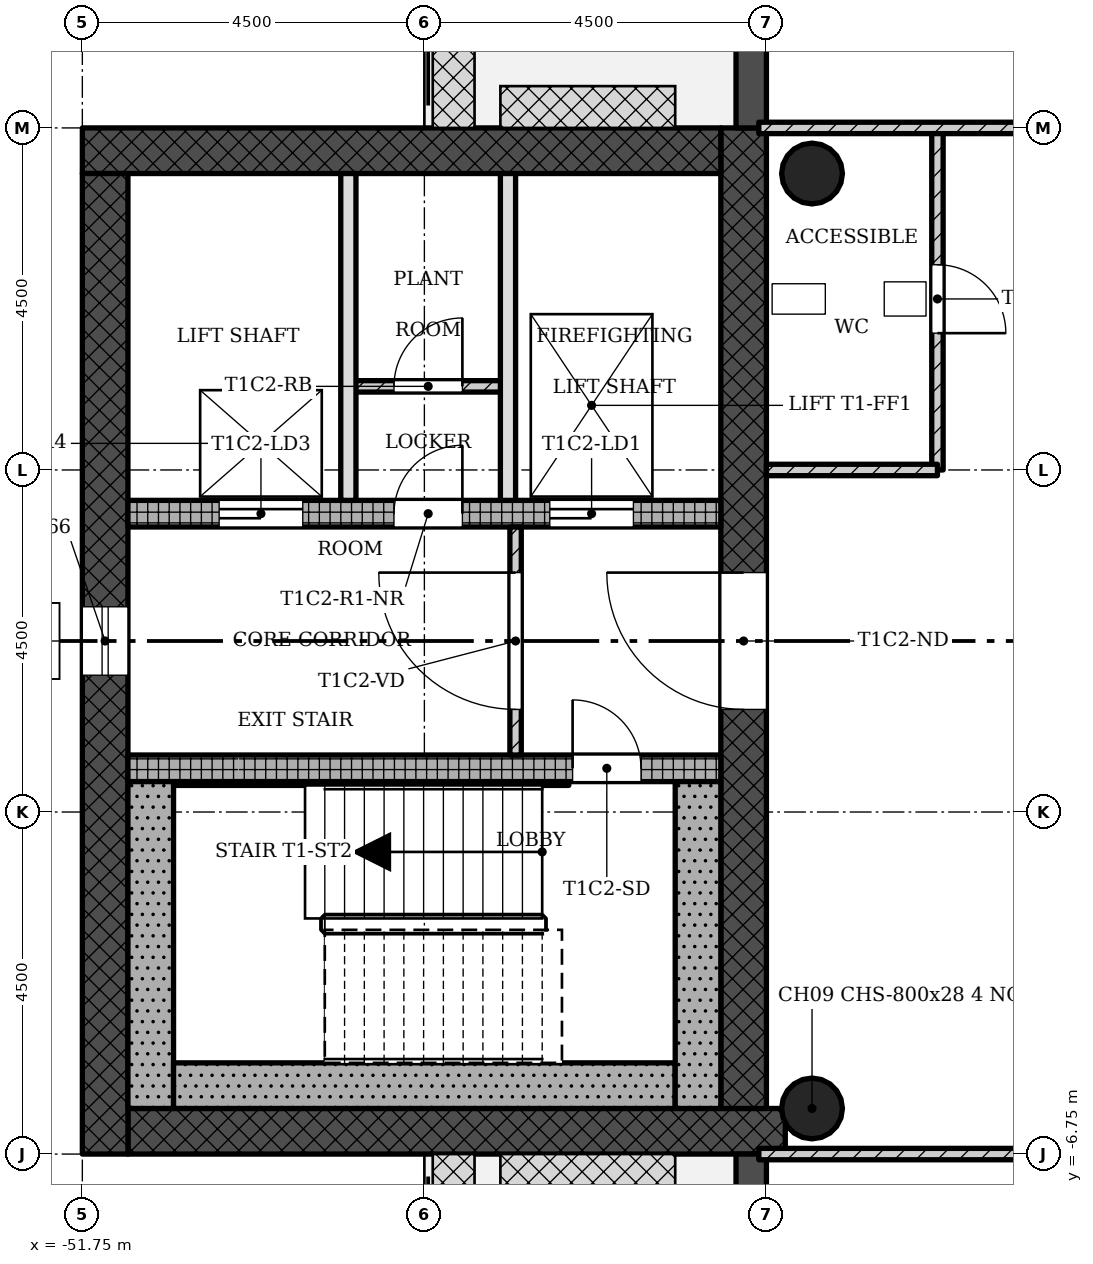
"""IFC4 building model, lengths in metres.
Left out: names, types, materials, properties, quantities, classifications, styles, units other than length and angle.
Written with IfcOpenShell. Run it as: python <this file> out.ifc"""

import sys

from ifc_helpers import new_model, si_unit, direction, frame, frame_2d, origin, origin_2d, place, context, subcontext, project, spatial, rectangle, hollow_circle, extrude, element, fill, save


model = new_model("IFC4")
c1 = context("Model", 3, precision=1e-05, world=origin(), true_north=direction((0.0, 1.0)))
c2 = subcontext(c1, "Body", "Model", "MODEL_VIEW")
j1 = project(units=[si_unit("LENGTHUNIT", "METRE"), si_unit("PLANEANGLEUNIT", "RADIAN")], contexts=[c1])
p1 = place(None, origin())
s1 = spatial("IfcSite", under=j1, at=p1, CompositionType="ELEMENT")
p2 = place(p1, origin())
s2 = spatial("IfcBuilding", under=s1, at=p2, CompositionType="ELEMENT")
p3 = place(p2, frame((0.0, 0.0, 237.9)))
s3 = spatial("IfcBuildingStorey", under=s2, at=p3, CompositionType="ELEMENT", Elevation=237.9)
p4 = place(p3, frame((-51.15, -6.45, 0.0), z_axis=(0.0, 0.0, 1.0), x_axis=(1.0, 0.0, 0.0)))
e1 = element("IfcWall", 1, at=p4, inside=s3, PredefinedType="SHEAR", context=c2, shape_type="SweptSolid", body=[
    extrude(rectangle(XDim=8.648, YDim=0.6, at=frame_2d((4.324, 0.0))), origin(), (0.0, 0.0, 1.0), 4.5),
])
p5 = place(p3, frame((-43.05, -6.15, 0.0), z_axis=(0.0, 0.0, 1.0), x_axis=(0.0, 1.0, 0.0)))
e2 = element("IfcWall", 2, at=p5, inside=s3, PredefinedType="SHEAR", context=c2, shape_type="SweptSolid", body=[
    extrude(rectangle(XDim=12.9, YDim=0.6, at=frame_2d((6.45, 0.0))), origin(), (0.0, 0.0, 1.0), 4.5),
])
p6 = place(p5, frame((5.25, 0.0, 0.0)))
e3 = element("IfcOpeningElement", 3, at=p6, cuts=e2, PredefinedType="OPENING", context=c2, shape_type="SweptSolid", body=[
    extrude(rectangle(XDim=1.8, YDim=2.1, at=frame_2d((0.9, 1.05))), frame((0.0, 0.31, 0.0), z_axis=(0.0, -1.0, 0.0), x_axis=(1.0, 0.0, 0.0)), (0.0, 0.0, 1.0), 0.62),
])
p7 = place(p3, frame((-43.35, 6.45, 0.0), z_axis=(0.0, 0.0, 1.0), x_axis=(-1.0, 0.0, 0.0)))
e4 = element("IfcWall", 4, at=p7, inside=s3, PredefinedType="SHEAR", context=c2, shape_type="SweptSolid", body=[
    extrude(rectangle(XDim=8.4, YDim=0.6, at=frame_2d((4.2, 0.0))), origin(), (0.0, 0.0, 1.0), 4.5),
])
p8 = place(p3, frame((-51.45, 6.15, 0.0), z_axis=(0.0, 0.0, 1.0), x_axis=(0.0, -1.0, 0.0)))
e5 = element("IfcWall", 5, at=p8, inside=s3, PredefinedType="SHEAR", context=c2, shape_type="SweptSolid", body=[
    extrude(rectangle(XDim=12.9, YDim=0.6, at=frame_2d((6.45, 0.0))), origin(), (0.0, 0.0, 1.0), 4.5),
])
p9 = place(p8, frame((5.7, 0.0, 0.45)))
e6 = element("IfcOpeningElement", 6, at=p9, cuts=e5, PredefinedType="OPENING", context=c2, shape_type="SweptSolid", body=[
    extrude(rectangle(XDim=0.9, YDim=2.4, at=frame_2d((0.45, 1.2))), frame((0.0, 0.31, 0.0), z_axis=(0.0, -1.0, 0.0), x_axis=(1.0, 0.0, 0.0)), (0.0, 0.0, 1.0), 0.62),
])
p10 = place(p3, frame((-51.15, -1.675, 0.0), z_axis=(0.0, 0.0, 1.0), x_axis=(1.0, 0.0, 0.0)))
e7 = element("IfcWall", 7, at=p10, inside=s3, PredefinedType="SHEAR", context=c2, shape_type="SweptSolid", body=[
    extrude(rectangle(XDim=7.8, YDim=0.35, at=frame_2d((3.9, 0.0))), origin(), (0.0, 0.0, 1.0), 4.5),
])
p11 = place(p10, frame((5.85, 0.0, 0.0)))
e8 = element("IfcOpeningElement", 8, at=p11, cuts=e7, PredefinedType="OPENING", context=c2, shape_type="SweptSolid", body=[
    extrude(rectangle(XDim=0.9, YDim=2.1, at=frame_2d((0.45, 1.05))), frame((0.0, 0.185, 0.0), z_axis=(0.0, -1.0, 0.0), x_axis=(1.0, 0.0, 0.0)), (0.0, 0.0, 1.0), 0.37),
])
p12 = place(p3, frame((-51.15, 1.675, 0.0), z_axis=(0.0, 0.0, 1.0), x_axis=(1.0, 0.0, 0.0)))
e9 = element("IfcWall", 9, at=p12, inside=s3, PredefinedType="SHEAR", context=c2, shape_type="SweptSolid", body=[
    extrude(rectangle(XDim=7.8, YDim=0.35, at=frame_2d((3.9, 0.0))), origin(), (0.0, 0.0, 1.0), 4.5),
])
p13 = place(p12, frame((5.55, 0.0, 0.0)))
e10 = element("IfcOpeningElement", 10, at=p13, cuts=e9, PredefinedType="OPENING", context=c2, shape_type="SweptSolid", body=[
    extrude(rectangle(XDim=1.1, YDim=2.1, at=frame_2d((0.55, 1.05))), frame((0.0, 0.185, 0.0), z_axis=(0.0, -1.0, 0.0), x_axis=(1.0, 0.0, 0.0)), (0.0, 0.0, 1.0), 0.37),
])
p14 = place(p12, frame((1.2, 0.0, 0.0)))
e11 = element("IfcOpeningElement", 11, at=p14, cuts=e9, PredefinedType="OPENING", context=c2, shape_type="SweptSolid", body=[
    extrude(rectangle(XDim=1.1, YDim=2.1, at=frame_2d((0.55, 1.05))), frame((0.0, 0.185, 0.0), z_axis=(0.0, -1.0, 0.0), x_axis=(1.0, 0.0, 0.0)), (0.0, 0.0, 1.0), 0.37),
])
p15 = place(p12, frame((3.5, 0.0, 0.0)))
e12 = element("IfcOpeningElement", 12, at=p15, cuts=e9, PredefinedType="OPENING", context=c2, shape_type="SweptSolid", body=[
    extrude(rectangle(XDim=0.9, YDim=2.1, at=frame_2d((0.45, 1.05))), frame((0.0, 0.185, 0.0), z_axis=(0.0, -1.0, 0.0), x_axis=(1.0, 0.0, 0.0)), (0.0, 0.0, 1.0), 0.37),
])
for number, where, z_axis, x_axis in (
    (13, (-42.15, -6.15, 0.0), (0.0, 0.0, 1.0), (1.0, 0.0, 0.0)),
    (14, (-42.15, 6.15, 0.0), (0.0, 0.0, 1.0), (1.0, 0.0, 0.0)),
):
    element("IfcColumn", number, at=place(p3, frame(where, z_axis=z_axis, x_axis=x_axis)), inside=s3, PredefinedType="COLUMN", context=c2, shape_type="SweptSolid", body=[
        extrude(hollow_circle(Radius=0.4, WallThickness=0.028, at=origin_2d()), origin(), (0.0, 0.0, 1.0), 4.5),
    ])
p16 = place(p3, frame((-42.95, -6.75, -0.02), z_axis=(0.0, 0.0, 1.0), x_axis=(0.0, -1.0, 0.0)))
e15 = element("IfcWall", 15, at=p16, inside=s3, PredefinedType="STANDARD", context=c2, shape_type="SweptSolid", body=[
    extrude(rectangle(XDim=4.5, YDim=0.4, at=frame_2d((2.25, 0.0))), origin(), (0.0, 0.0, 1.0), 4.22),
])
p17 = place(p16, frame((1.35, 0.0, 0.02)))
e16 = element("IfcOpeningElement", 16, at=p17, cuts=e15, PredefinedType="OPENING", context=c2, shape_type="SweptSolid", body=[
    extrude(rectangle(XDim=1.8, YDim=2.1, at=frame_2d((0.9, 1.05))), frame((0.0, 0.21, 0.0), z_axis=(0.0, -1.0, 0.0), x_axis=(1.0, 0.0, 0.0)), (0.0, 0.0, 1.0), 0.42),
])
p18 = place(p3, frame((-42.95, 11.25, -0.02), z_axis=(0.0, 0.0, 1.0), x_axis=(0.0, -1.0, 0.0)))
e17 = element("IfcWall", 17, at=p18, inside=s3, PredefinedType="STANDARD", context=c2, shape_type="SweptSolid", body=[
    extrude(rectangle(XDim=4.5, YDim=0.4, at=frame_2d((2.25, 0.0))), origin(), (0.0, 0.0, 1.0), 4.22),
])
p19 = place(p18, frame((1.35, 0.0, 0.02)))
e18 = element("IfcOpeningElement", 18, at=p19, cuts=e17, PredefinedType="OPENING", context=c2, shape_type="SweptSolid", body=[
    extrude(rectangle(XDim=1.8, YDim=2.1, at=frame_2d((0.9, 1.05))), frame((0.0, 0.21, 0.0), z_axis=(0.0, -1.0, 0.0), x_axis=(1.0, 0.0, 0.0)), (0.0, 0.0, 1.0), 0.42),
])
p20 = place(p3, frame((-46.05, 1.5, 0.0), z_axis=(0.0, 0.0, 1.0), x_axis=(0.0, -1.0, 0.0)))
e19 = element("IfcWall", 19, at=p20, inside=s3, PredefinedType="PARTITIONING", context=c2, shape_type="SweptSolid", body=[
    extrude(rectangle(XDim=3.0, YDim=0.15, at=frame_2d((1.5, 0.0))), origin(), (0.0, 0.0, 1.0), 4.1),
])
p21 = place(p20, frame((0.6, 0.0, 0.0)))
e20 = element("IfcOpeningElement", 20, at=p21, cuts=e19, PredefinedType="OPENING", context=c2, shape_type="SweptSolid", body=[
    extrude(rectangle(XDim=1.8, YDim=2.1, at=frame_2d((0.9, 1.05))), frame((0.0, 0.085, 0.0), z_axis=(0.0, -1.0, 0.0), x_axis=(1.0, 0.0, 0.0)), (0.0, 0.0, 1.0), 0.17),
])
for number, where, z_axis, x_axis in (
    (21, (-48.25, 6.15, 0.0), (0.0, 0.0, 1.0), (0.0, -1.0, 0.0)),
    (22, (-46.15, 6.15, 0.0), (0.0, 0.0, 1.0), (0.0, -1.0, 0.0)),
):
    element("IfcWall", number, at=place(p3, frame(where, z_axis=z_axis, x_axis=x_axis)), inside=s3, PredefinedType="SOLIDWALL", context=c2, shape_type="SweptSolid", body=[
        extrude(rectangle(XDim=4.3, YDim=0.2, at=frame_2d((2.15, 0.0))), origin(), (0.0, 0.0, 1.0), 4.1),
    ])
p22 = place(p3, frame((-46.15, 3.35, 0.0), z_axis=(0.0, 0.0, 1.0), x_axis=(-1.0, 0.0, 0.0)))
e23 = element("IfcWall", 23, at=p22, inside=s3, PredefinedType="PARTITIONING", context=c2, shape_type="SweptSolid", body=[
    extrude(rectangle(XDim=2.1, YDim=0.15, at=frame_2d((1.05, 0.0))), origin(), (0.0, 0.0, 1.0), 4.1),
])
p23 = place(p22, frame((0.6, 0.0, 0.0)))
e24 = element("IfcOpeningElement", 24, at=p23, cuts=e23, PredefinedType="OPENING", context=c2, shape_type="SweptSolid", body=[
    extrude(rectangle(XDim=0.9, YDim=2.1, at=frame_2d((0.45, 1.05))), frame((0.0, 0.085, 0.0), z_axis=(0.0, -1.0, 0.0), x_axis=(1.0, 0.0, 0.0)), (0.0, 0.0, 1.0), 0.17),
])
p24 = place(p3, frame((-40.5, 2.25, 0.0), z_axis=(0.0, 0.0, 1.0), x_axis=(0.0, 1.0, 0.0)))
e25 = element("IfcWall", 25, at=p24, inside=s3, PredefinedType="PARTITIONING", context=c2, shape_type="SweptSolid", body=[
    extrude(rectangle(XDim=4.5, YDim=0.15, at=frame_2d((2.25, 0.0))), origin(), (0.0, 0.0, 1.0), 4.1),
])
p25 = place(p24, frame((1.8, 0.0, 0.0)))
e26 = element("IfcOpeningElement", 26, at=p25, cuts=e25, PredefinedType="OPENING", context=c2, shape_type="SweptSolid", body=[
    extrude(rectangle(XDim=0.9, YDim=2.1, at=frame_2d((0.45, 1.05))), frame((0.0, 0.085, 0.0), z_axis=(0.0, -1.0, 0.0), x_axis=(1.0, 0.0, 0.0)), (0.0, 0.0, 1.0), 0.17),
])
p26 = place(p3, frame((-42.75, 2.25, 0.0), z_axis=(0.0, 0.0, 1.0), x_axis=(1.0, 0.0, 0.0)))
e27 = element("IfcWall", 27, at=p26, inside=s3, PredefinedType="PARTITIONING", context=c2, shape_type="SweptSolid", body=[
    extrude(rectangle(XDim=2.25, YDim=0.15, at=frame_2d((1.125, 0.0))), origin(), (0.0, 0.0, 1.0), 4.1),
])
p27 = place(p3, frame((-42.85, 6.75, 0.0), z_axis=(0.0, 0.0, 1.0), x_axis=(1.0, 0.0, 0.0)))
e28 = element("IfcWall", 28, at=p27, inside=s3, PredefinedType="PARTITIONING", context=c2, shape_type="SweptSolid", body=[
    extrude(rectangle(XDim=13.7, YDim=0.15, at=frame_2d((6.85, 0.0))), origin(), (0.0, 0.0, 1.0), 4.1),
])
p28 = place(p27, frame((5.95, 0.0, 0.0)))
e29 = element("IfcOpeningElement", 29, at=p28, cuts=e28, PredefinedType="OPENING", context=c2, shape_type="SweptSolid", body=[
    extrude(rectangle(XDim=1.8, YDim=2.1, at=frame_2d((0.9, 1.05))), frame((0.0, 0.085, 0.0), z_axis=(0.0, -1.0, 0.0), x_axis=(1.0, 0.0, 0.0)), (0.0, 0.0, 1.0), 0.17),
])
p29 = place(p3, frame((-42.85, -6.75, 0.0), z_axis=(0.0, 0.0, 1.0), x_axis=(1.0, 0.0, 0.0)))
e30 = element("IfcWall", 30, at=p29, inside=s3, PredefinedType="PARTITIONING", context=c2, shape_type="SweptSolid", body=[
    extrude(rectangle(XDim=13.7, YDim=0.15, at=frame_2d((6.85, 0.0))), origin(), (0.0, 0.0, 1.0), 4.1),
])
p30 = place(p29, frame((5.95, 0.0, 0.0)))
e31 = element("IfcOpeningElement", 31, at=p30, cuts=e30, PredefinedType="OPENING", context=c2, shape_type="SweptSolid", body=[
    extrude(rectangle(XDim=1.8, YDim=2.1, at=frame_2d((0.9, 1.05))), frame((0.0, 0.085, 0.0), z_axis=(0.0, -1.0, 0.0), x_axis=(1.0, 0.0, 0.0)), (0.0, 0.0, 1.0), 0.17),
])
p31 = place(p3, frame((-50.85, -1.85, 0.0), z_axis=(0.0, 0.0, 1.0), x_axis=(0.0, -1.0, 0.0)))
e32 = element("IfcWall", 32, at=p31, inside=s3, PredefinedType="SHEAR", context=c2, shape_type="SweptSolid", body=[
    extrude(rectangle(XDim=4.3, YDim=0.6, at=frame_2d((2.15, 0.0))), origin(), (0.0, 0.0, 1.0), 4.5),
])
p32 = place(p3, frame((-43.95, -5.85, 0.0), z_axis=(0.0, 0.0, 1.0), x_axis=(-1.0, 0.0, 0.0)))
e33 = element("IfcWall", 33, at=p32, inside=s3, PredefinedType="SHEAR", context=c2, shape_type="SweptSolid", body=[
    extrude(rectangle(XDim=6.6, YDim=0.6, at=frame_2d((3.3, 0.0))), origin(), (0.0, 0.0, 1.0), 4.5),
])
p33 = place(p3, frame((-43.65, -1.85, 0.0), z_axis=(0.0, 0.0, 1.0), x_axis=(0.0, -1.0, 0.0)))
e34 = element("IfcWall", 34, at=p33, inside=s3, PredefinedType="SHEAR", context=c2, shape_type="SweptSolid", body=[
    extrude(rectangle(XDim=4.3, YDim=0.6, at=frame_2d((2.15, 0.0))), origin(), (0.0, 0.0, 1.0), 4.5),
])
p34 = place(p3, frame((-45.35, -1.875, 0.0), z_axis=(0.0, 0.0, 1.0), x_axis=(-1.0, 0.0, 0.0)))
e35 = element("IfcWall", 35, at=p34, inside=s3, PredefinedType="SHEAR", context=c2, shape_type="SweptSolid", body=[
    extrude(rectangle(XDim=5.2, YDim=0.05, at=frame_2d((2.6, 0.0))), origin(), (0.0, 0.0, 1.0), 4.5),
])
p35 = place(p9, origin())
e36 = element("IfcWindow", 36, at=p35, inside=s3, PartitioningType="SINGLE_PANEL", PredefinedType="WINDOW", context=c2, shape_type="SweptSolid", body=[
    extrude(rectangle(XDim=0.9, YDim=2.4, at=frame_2d((0.45, 1.2))), frame((0.0, 0.03, 0.0), z_axis=(0.0, -1.0, 0.0), x_axis=(1.0, 0.0, 0.0)), (0.0, 0.0, 1.0), 0.06),
])
fill(e6, e36)
p36 = place(p21, origin())
e37 = element("IfcDoor", 37, at=p36, inside=s3, OperationType="SINGLE_SWING_LEFT", PredefinedType="DOOR", context=c2, shape_type="SweptSolid", body=[
    extrude(rectangle(XDim=1.8, YDim=2.1, at=frame_2d((0.9, 1.05))), frame((0.0, 0.025, 0.0), z_axis=(0.0, -1.0, 0.0), x_axis=(1.0, 0.0, 0.0)), (0.0, 0.0, 1.0), 0.05),
])
fill(e20, e37)
p37 = place(p23, origin())
e38 = element("IfcDoor", 38, at=p37, inside=s3, OperationType="SINGLE_SWING_LEFT", PredefinedType="DOOR", context=c2, shape_type="SweptSolid", body=[
    extrude(rectangle(XDim=0.9, YDim=2.1, at=frame_2d((0.45, 1.05))), frame((0.0, 0.025, 0.0), z_axis=(0.0, -1.0, 0.0), x_axis=(1.0, 0.0, 0.0)), (0.0, 0.0, 1.0), 0.05),
])
fill(e24, e38)
p38 = place(p25, origin())
e39 = element("IfcDoor", 39, at=p38, inside=s3, OperationType="SINGLE_SWING_LEFT", PredefinedType="DOOR", context=c2, shape_type="SweptSolid", body=[
    extrude(rectangle(XDim=0.9, YDim=2.1, at=frame_2d((0.45, 1.05))), frame((0.0, 0.025, 0.0), z_axis=(0.0, -1.0, 0.0), x_axis=(1.0, 0.0, 0.0)), (0.0, 0.0, 1.0), 0.05),
])
fill(e26, e39)
p39 = place(p11, origin())
e40 = element("IfcDoor", 40, at=p39, inside=s3, OperationType="SINGLE_SWING_RIGHT", PredefinedType="DOOR", context=c2, shape_type="SweptSolid", body=[
    extrude(rectangle(XDim=0.9, YDim=2.1, at=frame_2d((0.45, 1.05))), frame((0.0, 0.025, 0.0), z_axis=(0.0, -1.0, 0.0), x_axis=(1.0, 0.0, 0.0)), (0.0, 0.0, 1.0), 0.05),
])
fill(e8, e40)
p40 = place(p13, origin())
e41 = element("IfcDoor", 41, at=p40, inside=s3, OperationType="SLIDING_TO_LEFT", PredefinedType="DOOR", context=c2, shape_type="SweptSolid", body=[
    extrude(rectangle(XDim=1.1, YDim=2.1, at=frame_2d((0.55, 1.05))), frame((0.0, 0.025, 0.0), z_axis=(0.0, -1.0, 0.0), x_axis=(1.0, 0.0, 0.0)), (0.0, 0.0, 1.0), 0.05),
])
fill(e10, e41)
p41 = place(p14, origin())
e42 = element("IfcDoor", 42, at=p41, inside=s3, OperationType="SLIDING_TO_LEFT", PredefinedType="DOOR", context=c2, shape_type="SweptSolid", body=[
    extrude(rectangle(XDim=1.1, YDim=2.1, at=frame_2d((0.55, 1.05))), frame((0.0, 0.025, 0.0), z_axis=(0.0, -1.0, 0.0), x_axis=(1.0, 0.0, 0.0)), (0.0, 0.0, 1.0), 0.05),
])
fill(e11, e42)
p42 = place(p15, origin())
e43 = element("IfcDoor", 43, at=p42, inside=s3, OperationType="SINGLE_SWING_LEFT", PredefinedType="DOOR", context=c2, shape_type="SweptSolid", body=[
    extrude(rectangle(XDim=0.9, YDim=2.1, at=frame_2d((0.45, 1.05))), frame((0.0, 0.025, 0.0), z_axis=(0.0, -1.0, 0.0), x_axis=(1.0, 0.0, 0.0)), (0.0, 0.0, 1.0), 0.05),
])
fill(e12, e43)
p43 = place(p6, origin())
e44 = element("IfcDoor", 44, at=p43, inside=s3, OperationType="SINGLE_SWING_LEFT", PredefinedType="DOOR", context=c2, shape_type="SweptSolid", body=[
    extrude(rectangle(XDim=1.8, YDim=2.1, at=frame_2d((0.9, 1.05))), frame((0.0, 0.025, 0.0), z_axis=(0.0, -1.0, 0.0), x_axis=(1.0, 0.0, 0.0)), (0.0, 0.0, 1.0), 0.05),
])
fill(e3, e44)
save(model, sys.argv[1])
